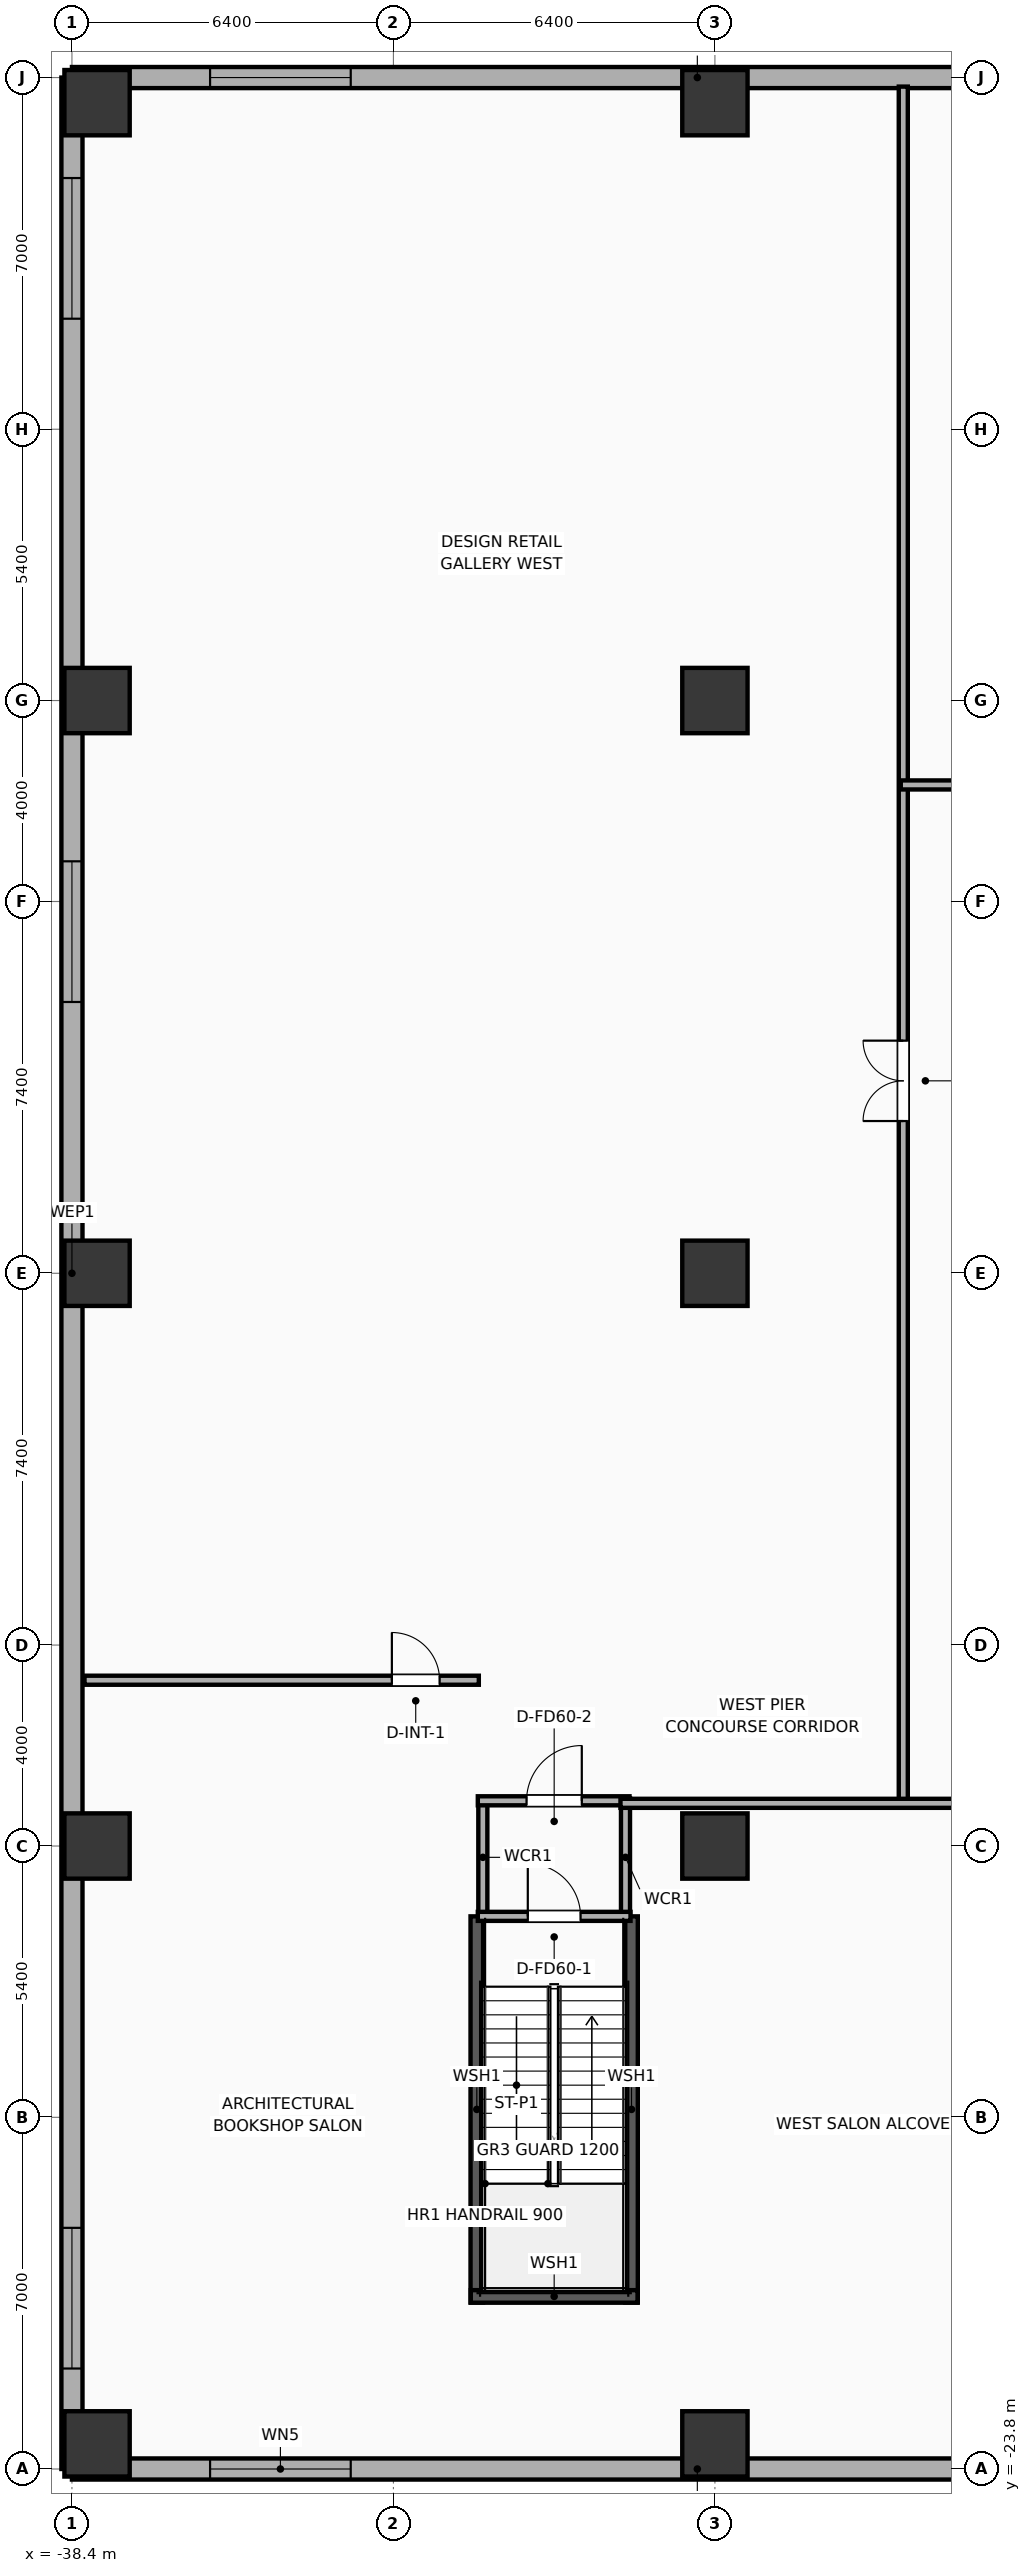
"""IFC4 building model, lengths in metres.
Left out: names, types, materials, properties, quantities, classifications, styles, units other than length and angle.
Written with IfcOpenShell. Run it as: python <this file> out.ifc"""

import sys

from ifc_helpers import new_model, si_unit, direction, frame, frame_2d, origin, origin_2d, place, context, subcontext, project, spatial, rectangle, extrude, element, fill, save


model = new_model("IFC4")
c1 = context("Model", 3, precision=1e-05, world=origin(), true_north=direction((0.0, 1.0)))
c2 = subcontext(c1, "Body", "Model", "MODEL_VIEW")
j1 = project(units=[si_unit("LENGTHUNIT", "METRE"), si_unit("PLANEANGLEUNIT", "RADIAN")], contexts=[c1])
p1 = place(None, origin())
s1 = spatial("IfcSite", under=j1, at=p1, CompositionType="ELEMENT")
p2 = place(p1, origin())
s2 = spatial("IfcBuilding", under=s1, at=p2, CompositionType="ELEMENT")
p3 = place(p2, frame((0.0, 0.0, 5.2)))
s3 = spatial("IfcBuildingStorey", under=s2, at=p3, CompositionType="ELEMENT", Elevation=5.2)
for number, where, z_axis, x_axis in (
    (1, (-30.34, -20.485, 0.0), (0.0, 0.0, 1.0), (0.0, 1.0, 0.0)),
    (2, (-27.26, -20.485, 0.0), (0.0, 0.0, 1.0), (0.0, 1.0, 0.0)),
):
    element("IfcWall", number, at=place(p3, frame(where, z_axis=z_axis, x_axis=x_axis)), inside=s3, PredefinedType="SOLIDWALL", context=c2, shape_type="SweptSolid", body=[
        extrude(rectangle(XDim=7.685, YDim=0.25, at=frame_2d((3.843, 0.0))), origin(), (0.0, 0.0, 1.0), 4.92),
    ])
p4 = place(p3, frame((-30.46, -20.365, 0.0), z_axis=(0.0, 0.0, 1.0), x_axis=(1.0, 0.0, 0.0)))
e3 = element("IfcWall", 3, at=p4, inside=s3, PredefinedType="SOLIDWALL", context=c2, shape_type="SweptSolid", body=[
    extrude(rectangle(XDim=3.32, YDim=0.25, at=frame_2d((1.66, 0.0))), origin(), (0.0, 0.0, 1.0), 4.92),
])
for number, where, z_axis, x_axis in (
    (4, (-37.9, -23.3, 0.0), (0.0, 0.0, 1.0), (1.0, 0.0, 0.0)),
    (5, (-37.9, -11.4, 0.0), (0.0, 0.0, 1.0), (1.0, 0.0, 0.0)),
    (6, (-37.9, 0.0, 0.0), (0.0, 0.0, 1.0), (1.0, 0.0, 0.0)),
    (7, (-37.9, 11.4, 0.0), (0.0, 0.0, 1.0), (1.0, 0.0, 0.0)),
    (8, (-37.9, 23.3, 0.0), (0.0, 0.0, 1.0), (1.0, 0.0, 0.0)),
    (9, (-25.6, -23.3, 0.0), (0.0, 0.0, 1.0), (1.0, 0.0, 0.0)),
    (10, (-25.6, -11.4, 0.0), (0.0, 0.0, 1.0), (1.0, 0.0, 0.0)),
    (11, (-25.6, 0.0, 0.0), (0.0, 0.0, 1.0), (1.0, 0.0, 0.0)),
    (12, (-25.6, 11.4, 0.0), (0.0, 0.0, 1.0), (1.0, 0.0, 0.0)),
    (13, (-25.6, 23.3, 0.0), (0.0, 0.0, 1.0), (1.0, 0.0, 0.0)),
):
    element("IfcColumn", number, at=place(p3, frame(where, z_axis=z_axis, x_axis=x_axis)), inside=s3, PredefinedType="COLUMN", context=c2, shape_type="SweptSolid", body=[
        extrude(rectangle(XDim=1.3, YDim=1.3, at=origin_2d()), origin(), (0.0, 0.0, 1.0), 5.2),
    ])
p5 = place(p3, frame((-38.4, -23.8, 0.0), z_axis=(0.0, 0.0, 1.0), x_axis=(1.0, 0.0, 0.0)))
e14 = element("IfcWall", 14, at=p5, inside=s3, PredefinedType="ELEMENTEDWALL", context=c2, shape_type="SweptSolid", body=[
    extrude(rectangle(XDim=24.9, YDim=0.42, at=frame_2d((12.45, 0.0))), origin(), (0.0, 0.0, 1.0), 4.92),
])
p6 = place(p5, frame((2.75, 0.0, 0.65)))
e15 = element("IfcOpeningElement", 15, at=p6, cuts=e14, PredefinedType="OPENING", context=c2, shape_type="SweptSolid", body=[
    extrude(rectangle(XDim=2.8, YDim=2.6, at=frame_2d((1.4, 1.3))), frame((0.0, 0.22, 0.0), z_axis=(0.0, -1.0, 0.0), x_axis=(1.0, 0.0, 0.0)), (0.0, 0.0, 1.0), 0.44),
])
p7 = place(p3, frame((-13.5, 23.8, 0.0), z_axis=(0.0, 0.0, 1.0), x_axis=(-1.0, 0.0, 0.0)))
e16 = element("IfcWall", 16, at=p7, inside=s3, PredefinedType="ELEMENTEDWALL", context=c2, shape_type="SweptSolid", body=[
    extrude(rectangle(XDim=24.9, YDim=0.42, at=frame_2d((12.45, 0.0))), origin(), (0.0, 0.0, 1.0), 4.92),
])
p8 = place(p7, frame((2.75, 0.0, 0.65)))
e17 = element("IfcOpeningElement", 17, at=p8, cuts=e16, PredefinedType="OPENING", context=c2, shape_type="SweptSolid", body=[
    extrude(rectangle(XDim=2.8, YDim=2.6, at=frame_2d((1.4, 1.3))), frame((0.0, 0.22, 0.0), z_axis=(0.0, -1.0, 0.0), x_axis=(1.0, 0.0, 0.0)), (0.0, 0.0, 1.0), 0.44),
])
p9 = place(p7, frame((19.35, 0.0, 0.65)))
e18 = element("IfcOpeningElement", 18, at=p9, cuts=e16, PredefinedType="OPENING", context=c2, shape_type="SweptSolid", body=[
    extrude(rectangle(XDim=2.8, YDim=2.6, at=frame_2d((1.4, 1.3))), frame((0.0, 0.22, 0.0), z_axis=(0.0, -1.0, 0.0), x_axis=(1.0, 0.0, 0.0)), (0.0, 0.0, 1.0), 0.44),
])
p10 = place(p3, frame((-38.4, 23.8, 0.0), z_axis=(0.0, 0.0, 1.0), x_axis=(0.0, -1.0, 0.0)))
e19 = element("IfcWall", 19, at=p10, inside=s3, PredefinedType="ELEMENTEDWALL", context=c2, shape_type="SweptSolid", body=[
    extrude(rectangle(XDim=47.6, YDim=0.42, at=frame_2d((23.8, 0.0))), origin(), (0.0, 0.0, 1.0), 4.92),
])
p11 = place(p10, frame((2.0, 0.0, 0.65)))
e20 = element("IfcOpeningElement", 20, at=p11, cuts=e19, PredefinedType="OPENING", context=c2, shape_type="SweptSolid", body=[
    extrude(rectangle(XDim=2.8, YDim=2.6, at=frame_2d((1.4, 1.3))), frame((0.0, 0.22, 0.0), z_axis=(0.0, -1.0, 0.0), x_axis=(1.0, 0.0, 0.0)), (0.0, 0.0, 1.0), 0.44),
])
p12 = place(p10, frame((15.6, 0.0, 0.65)))
e21 = element("IfcOpeningElement", 21, at=p12, cuts=e19, PredefinedType="OPENING", context=c2, shape_type="SweptSolid", body=[
    extrude(rectangle(XDim=2.8, YDim=2.6, at=frame_2d((1.4, 1.3))), frame((0.0, 0.22, 0.0), z_axis=(0.0, -1.0, 0.0), x_axis=(1.0, 0.0, 0.0)), (0.0, 0.0, 1.0), 0.44),
])
p13 = place(p10, frame((42.8, 0.0, 0.65)))
e22 = element("IfcOpeningElement", 22, at=p13, cuts=e19, PredefinedType="OPENING", context=c2, shape_type="SweptSolid", body=[
    extrude(rectangle(XDim=2.8, YDim=2.6, at=frame_2d((1.4, 1.3))), frame((0.0, 0.22, 0.0), z_axis=(0.0, -1.0, 0.0), x_axis=(1.0, 0.0, 0.0)), (0.0, 0.0, 1.0), 0.44),
])
for number, where, z_axis, x_axis in (
    (23, (-30.22, -12.8, 0.0), (0.0, 0.0, 1.0), (0.0, 1.0, 0.0)),
    (24, (-27.38, -12.8, 0.0), (0.0, 0.0, 1.0), (0.0, 1.0, 0.0)),
):
    element("IfcWall", number, at=place(p3, frame(where, z_axis=z_axis, x_axis=x_axis)), inside=s3, PredefinedType="PARTITIONING", context=c2, shape_type="SweptSolid", body=[
        extrude(rectangle(XDim=2.35, YDim=0.18, at=frame_2d((1.175, 0.0))), origin(), (0.0, 0.0, 1.0), 4.92),
    ])
p14 = place(p3, frame((-30.32, -12.8, 0.0), z_axis=(0.0, 0.0, 1.0), x_axis=(1.0, 0.0, 0.0)))
e25 = element("IfcWall", 25, at=p14, inside=s3, PredefinedType="PARTITIONING", context=c2, shape_type="SweptSolid", body=[
    extrude(rectangle(XDim=3.04, YDim=0.18, at=frame_2d((1.52, 0.0))), origin(), (0.0, 0.0, 1.0), 4.92),
])
p15 = place(p14, frame((0.995, 0.0, 0.0)))
e26 = element("IfcOpeningElement", 26, at=p15, cuts=e25, PredefinedType="OPENING", context=c2, shape_type="SweptSolid", body=[
    extrude(rectangle(XDim=1.05, YDim=2.05, at=frame_2d((0.525, 1.025))), frame((0.0, 0.1, 0.0), z_axis=(0.0, -1.0, 0.0), x_axis=(1.0, 0.0, 0.0)), (0.0, 0.0, 1.0), 0.2),
])
p16 = place(p3, frame((-30.32, -10.5, 0.0), z_axis=(0.0, 0.0, 1.0), x_axis=(1.0, 0.0, 0.0)))
e27 = element("IfcWall", 27, at=p16, inside=s3, PredefinedType="PARTITIONING", context=c2, shape_type="SweptSolid", body=[
    extrude(rectangle(XDim=3.02, YDim=0.18, at=frame_2d((1.51, 0.0))), origin(), (0.0, 0.0, 1.0), 4.92),
])
p17 = place(p16, frame((0.97, 0.0, 0.0)))
e28 = element("IfcOpeningElement", 28, at=p17, cuts=e27, PredefinedType="OPENING", context=c2, shape_type="SweptSolid", body=[
    extrude(rectangle(XDim=1.1, YDim=2.05, at=frame_2d((0.55, 1.025))), frame((0.0, 0.1, 0.0), z_axis=(0.0, -1.0, 0.0), x_axis=(1.0, 0.0, 0.0)), (0.0, 0.0, 1.0), 0.2),
])
p18 = place(p3, frame((-38.15, -8.1, 0.0), z_axis=(0.0, 0.0, 1.0), x_axis=(1.0, 0.0, 0.0)))
e29 = element("IfcWall", 29, at=p18, inside=s3, PredefinedType="PARTITIONING", context=c2, shape_type="SweptSolid", body=[
    extrude(rectangle(XDim=7.85, YDim=0.18, at=frame_2d((3.925, 0.0))), origin(), (0.0, 0.0, 1.0), 4.92),
])
p19 = place(p18, frame((6.119, 0.0, 0.0)))
e30 = element("IfcOpeningElement", 30, at=p19, cuts=e29, PredefinedType="OPENING", context=c2, shape_type="SweptSolid", body=[
    extrude(rectangle(XDim=0.95, YDim=2.05, at=frame_2d((0.475, 1.025))), frame((0.0, 0.1, 0.0), z_axis=(0.0, -1.0, 0.0), x_axis=(1.0, 0.0, 0.0)), (0.0, 0.0, 1.0), 0.2),
])
p20 = place(p3, frame((-21.85, -10.5, 0.0), z_axis=(0.0, 0.0, 1.0), x_axis=(0.0, 1.0, 0.0)))
e31 = element("IfcWall", 31, at=p20, inside=s3, PredefinedType="PARTITIONING", context=c2, shape_type="SweptSolid", body=[
    extrude(rectangle(XDim=34.12, YDim=0.18, at=frame_2d((17.06, 0.0))), origin(), (0.0, 0.0, 1.0), 4.92),
])
p21 = place(p20, frame((13.531, 0.0, 0.0)))
e32 = element("IfcOpeningElement", 32, at=p21, cuts=e31, PredefinedType="OPENING", context=c2, shape_type="SweptSolid", body=[
    extrude(rectangle(XDim=1.6, YDim=2.05, at=frame_2d((0.8, 1.025))), frame((0.0, 0.1, 0.0), z_axis=(0.0, -1.0, 0.0), x_axis=(1.0, 0.0, 0.0)), (0.0, 0.0, 1.0), 0.2),
])
p22 = place(p3, frame((-27.48, -10.55, 0.0), z_axis=(0.0, 0.0, 1.0), x_axis=(1.0, 0.0, 0.0)))
e33 = element("IfcWall", 33, at=p22, inside=s3, PredefinedType="PARTITIONING", context=c2, shape_type="SweptSolid", body=[
    extrude(rectangle(XDim=13.96, YDim=0.18, at=frame_2d((6.98, 0.0))), origin(), (0.0, 0.0, 1.0), 4.92),
])
p23 = place(p22, frame((6.775, 0.0, 0.0)))
e34 = element("IfcOpeningElement", 34, at=p23, cuts=e33, PredefinedType="OPENING", context=c2, shape_type="SweptSolid", body=[
    extrude(rectangle(XDim=0.95, YDim=2.05, at=frame_2d((0.475, 1.025))), frame((0.0, 0.1, 0.0), z_axis=(0.0, -1.0, 0.0), x_axis=(1.0, 0.0, 0.0)), (0.0, 0.0, 1.0), 0.2),
])
p24 = place(p22, frame((11.223, 0.0, 0.0)))
e35 = element("IfcOpeningElement", 35, at=p24, cuts=e33, PredefinedType="OPENING", context=c2, shape_type="SweptSolid", body=[
    extrude(rectangle(XDim=1.0, YDim=2.05, at=frame_2d((0.5, 1.025))), frame((0.0, 0.1, 0.0), z_axis=(0.0, -1.0, 0.0), x_axis=(1.0, 0.0, 0.0)), (0.0, 0.0, 1.0), 0.2),
])
p25 = place(p3, frame((-21.9, 9.72, 0.0), z_axis=(0.0, 0.0, 1.0), x_axis=(1.0, 0.0, 0.0)))
e36 = element("IfcWall", 36, at=p25, inside=s3, PredefinedType="PARTITIONING", context=c2, shape_type="SweptSolid", body=[
    extrude(rectangle(XDim=8.38, YDim=0.18, at=frame_2d((4.19, 0.0))), origin(), (0.0, 0.0, 1.0), 4.92),
])
p26 = place(p25, frame((3.39, 0.0, 0.0)))
e37 = element("IfcOpeningElement", 37, at=p26, cuts=e36, PredefinedType="OPENING", context=c2, shape_type="SweptSolid", body=[
    extrude(rectangle(XDim=1.6, YDim=2.05, at=frame_2d((0.8, 1.025))), frame((0.0, 0.1, 0.0), z_axis=(0.0, -1.0, 0.0), x_axis=(1.0, 0.0, 0.0)), (0.0, 0.0, 1.0), 0.2),
])
p27 = place(p6, origin())
e38 = element("IfcWindow", 38, at=p27, inside=s3, PartitioningType="SINGLE_PANEL", PredefinedType="WINDOW", context=c2, shape_type="SweptSolid", body=[
    extrude(rectangle(XDim=2.8, YDim=2.6, at=frame_2d((1.4, 1.3))), frame((0.0, 0.03, 0.0), z_axis=(0.0, -1.0, 0.0), x_axis=(1.0, 0.0, 0.0)), (0.0, 0.0, 1.0), 0.06),
])
fill(e15, e38)
p28 = place(p9, origin())
e39 = element("IfcWindow", 39, at=p28, inside=s3, PartitioningType="SINGLE_PANEL", PredefinedType="WINDOW", context=c2, shape_type="SweptSolid", body=[
    extrude(rectangle(XDim=2.8, YDim=2.6, at=frame_2d((1.4, 1.3))), frame((0.0, 0.03, 0.0), z_axis=(0.0, -1.0, 0.0), x_axis=(1.0, 0.0, 0.0)), (0.0, 0.0, 1.0), 0.06),
])
fill(e18, e39)
p29 = place(p11, origin())
e40 = element("IfcWindow", 40, at=p29, inside=s3, PartitioningType="SINGLE_PANEL", PredefinedType="WINDOW", context=c2, shape_type="SweptSolid", body=[
    extrude(rectangle(XDim=2.8, YDim=2.6, at=frame_2d((1.4, 1.3))), frame((0.0, 0.03, 0.0), z_axis=(0.0, -1.0, 0.0), x_axis=(1.0, 0.0, 0.0)), (0.0, 0.0, 1.0), 0.06),
])
fill(e20, e40)
p30 = place(p12, origin())
e41 = element("IfcWindow", 41, at=p30, inside=s3, PartitioningType="SINGLE_PANEL", PredefinedType="WINDOW", context=c2, shape_type="SweptSolid", body=[
    extrude(rectangle(XDim=2.8, YDim=2.6, at=frame_2d((1.4, 1.3))), frame((0.0, 0.03, 0.0), z_axis=(0.0, -1.0, 0.0), x_axis=(1.0, 0.0, 0.0)), (0.0, 0.0, 1.0), 0.06),
])
fill(e21, e41)
p31 = place(p13, origin())
e42 = element("IfcWindow", 42, at=p31, inside=s3, PartitioningType="SINGLE_PANEL", PredefinedType="WINDOW", context=c2, shape_type="SweptSolid", body=[
    extrude(rectangle(XDim=2.8, YDim=2.6, at=frame_2d((1.4, 1.3))), frame((0.0, 0.03, 0.0), z_axis=(0.0, -1.0, 0.0), x_axis=(1.0, 0.0, 0.0)), (0.0, 0.0, 1.0), 0.06),
])
fill(e22, e42)
p32 = place(p15, origin())
e43 = element("IfcDoor", 43, at=p32, inside=s3, OperationType="SINGLE_SWING_LEFT", PredefinedType="DOOR", context=c2, shape_type="SweptSolid", body=[
    extrude(rectangle(XDim=1.05, YDim=2.05, at=frame_2d((0.525, 1.025))), frame((0.0, 0.025, 0.0), z_axis=(0.0, -1.0, 0.0), x_axis=(1.0, 0.0, 0.0)), (0.0, 0.0, 1.0), 0.05),
])
fill(e26, e43)
p33 = place(p17, origin())
e44 = element("IfcDoor", 44, at=p33, inside=s3, OperationType="SINGLE_SWING_RIGHT", PredefinedType="DOOR", context=c2, shape_type="SweptSolid", body=[
    extrude(rectangle(XDim=1.1, YDim=2.05, at=frame_2d((0.55, 1.025))), frame((0.0, 0.025, 0.0), z_axis=(0.0, -1.0, 0.0), x_axis=(1.0, 0.0, 0.0)), (0.0, 0.0, 1.0), 0.05),
])
fill(e28, e44)
p34 = place(p19, origin())
e45 = element("IfcDoor", 45, at=p34, inside=s3, OperationType="SINGLE_SWING_LEFT", PredefinedType="DOOR", context=c2, shape_type="SweptSolid", body=[
    extrude(rectangle(XDim=0.95, YDim=2.05, at=frame_2d((0.475, 1.025))), frame((0.0, 0.025, 0.0), z_axis=(0.0, -1.0, 0.0), x_axis=(1.0, 0.0, 0.0)), (0.0, 0.0, 1.0), 0.05),
])
fill(e30, e45)
p35 = place(p21, origin())
e46 = element("IfcDoor", 46, at=p35, inside=s3, OperationType="DOUBLE_DOOR_SINGLE_SWING", PredefinedType="DOOR", context=c2, shape_type="SweptSolid", body=[
    extrude(rectangle(XDim=1.6, YDim=2.05, at=frame_2d((0.8, 1.025))), frame((0.0, 0.025, 0.0), z_axis=(0.0, -1.0, 0.0), x_axis=(1.0, 0.0, 0.0)), (0.0, 0.0, 1.0), 0.05),
])
fill(e32, e46)
save(model, sys.argv[1])
